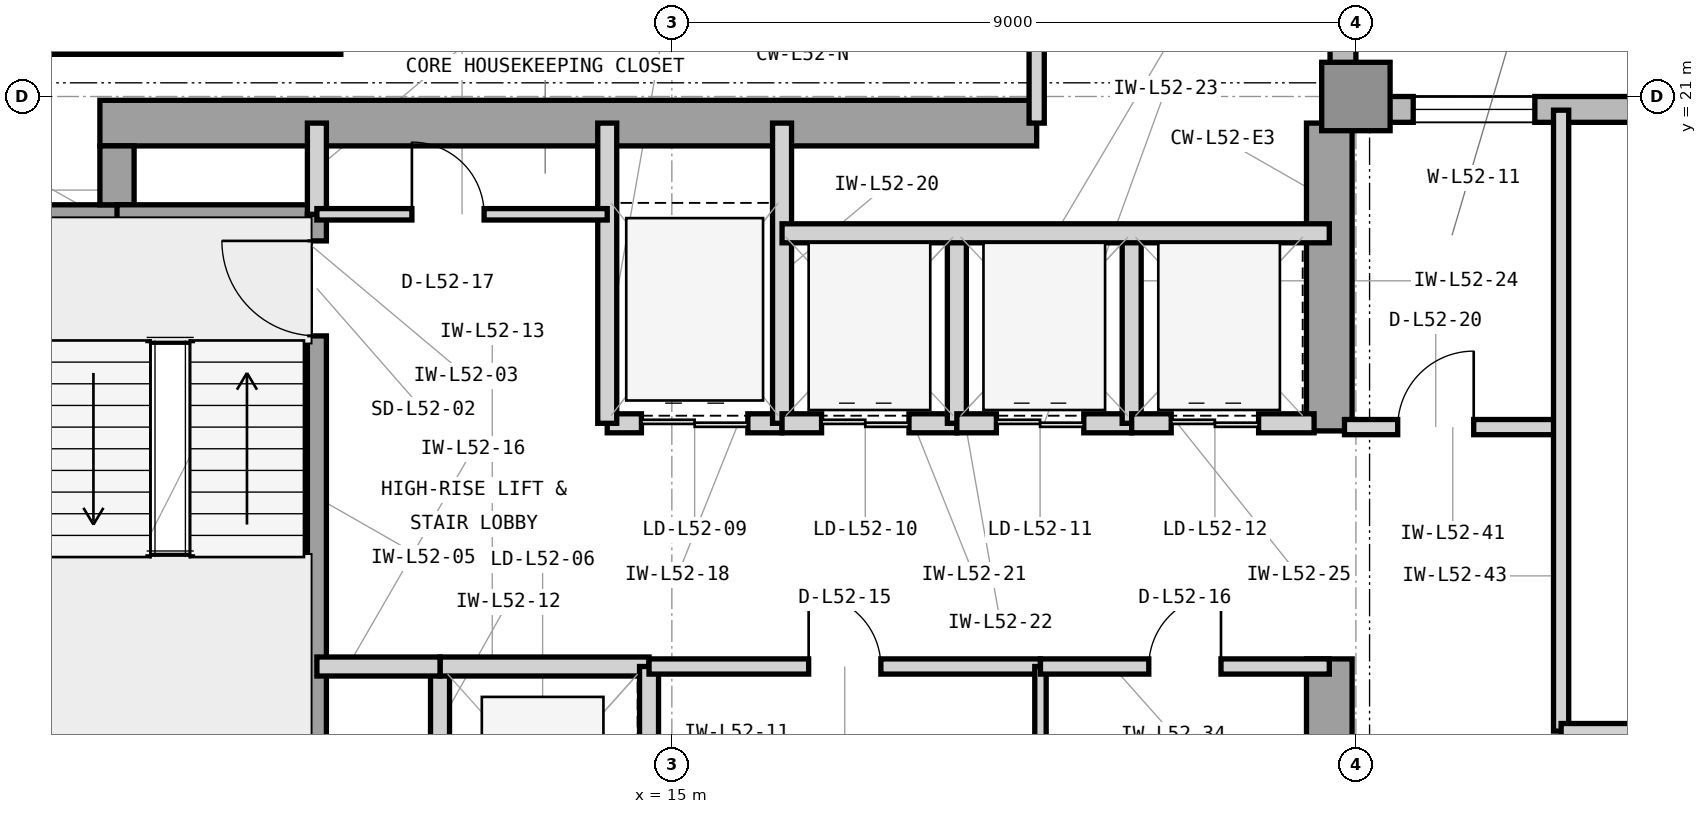
"""IFC4 building model, lengths in metres.
Left out: names, types, materials, properties, quantities, classifications, styles, units other than length and angle.
Written with IfcOpenShell. Run it as: python <this file> out.ifc"""

import sys

from ifc_helpers import new_model, si_unit, direction, frame, frame_2d, origin, origin_2d, place, context, subcontext, project, spatial, rectangle, extrude, element, fill, save


model = new_model("IFC4")
c1 = context("Model", 3, precision=1e-05, world=origin(), true_north=direction((0.0, 1.0)))
c2 = subcontext(c1, "Body", "Model", "MODEL_VIEW")
j1 = project(units=[si_unit("LENGTHUNIT", "METRE"), si_unit("PLANEANGLEUNIT", "RADIAN")], contexts=[c1])
p1 = place(None, origin())
s1 = spatial("IfcSite", under=j1, at=p1, CompositionType="ELEMENT")
p2 = place(p1, origin())
s2 = spatial("IfcBuilding", under=s1, at=p2, CompositionType="ELEMENT")
p3 = place(p2, frame((0.0, 0.0, 215.1)))
s3 = spatial("IfcBuildingStorey", under=s2, at=p3, CompositionType="ELEMENT", Elevation=215.1)
p4 = place(p3, frame((7.475, 20.65, 0.0), z_axis=(0.0, 0.0, 1.0), x_axis=(1.0, 0.0, 0.0)))
e1 = element("IfcWall", 1, at=p4, inside=s3, PredefinedType="SHEAR", context=c2, shape_type="SweptSolid", body=[
    extrude(rectangle(XDim=12.325, YDim=0.6, at=frame_2d((6.163, 0.0))), origin(), (0.0, 0.0, 1.0), 3.9),
])
p5 = place(p3, frame((23.65, 10.4, 0.0), z_axis=(0.0, 0.0, 1.0), x_axis=(0.0, 1.0, 0.0)))
e2 = element("IfcWall", 2, at=p5, inside=s3, PredefinedType="SHEAR", context=c2, shape_type="SweptSolid", body=[
    extrude(rectangle(XDim=3.2, YDim=0.6, at=frame_2d((1.6, 0.0))), origin(), (0.0, 0.0, 1.0), 3.9),
])
p6 = place(p3, frame((23.65, 16.6, 0.0), z_axis=(0.0, 0.0, 1.0), x_axis=(0.0, 1.0, 0.0)))
e3 = element("IfcWall", 3, at=p6, inside=s3, PredefinedType="SHEAR", context=c2, shape_type="SweptSolid", body=[
    extrude(rectangle(XDim=4.05, YDim=0.6, at=frame_2d((2.025, 0.0))), origin(), (0.0, 0.0, 1.0), 3.9),
])
p7 = place(p3, frame((6.65, 19.35, 0.0), z_axis=(0.0, 0.0, 1.0), x_axis=(1.0, 0.0, 0.0)))
e4 = element("IfcWall", 4, at=p7, inside=s3, PredefinedType="SHEAR", context=c2, shape_type="SweptSolid", body=[
    extrude(rectangle(XDim=1.275, YDim=0.45, at=frame_2d((0.638, 0.0))), origin(), (0.0, 0.0, 1.0), 3.9),
])
p8 = place(p3, frame((7.7, 19.575, 0.0), z_axis=(0.0, 0.0, 1.0), x_axis=(0.0, 1.0, 0.0)))
e5 = element("IfcWall", 5, at=p8, inside=s3, PredefinedType="SHEAR", context=c2, shape_type="SweptSolid", body=[
    extrude(rectangle(XDim=0.775, YDim=0.45, at=frame_2d((0.388, 0.0))), origin(), (0.0, 0.0, 1.0), 3.9),
])
p9 = place(p3, frame((24.0, 21.0, 0.0), z_axis=(0.0, 0.0, 1.0), x_axis=(1.0, 0.0, 0.0)))
e6 = element("IfcColumn", 6, at=p9, inside=s3, PredefinedType="COLUMN", context=c2, shape_type="SweptSolid", body=[
    extrude(rectangle(XDim=0.9, YDim=0.9, at=origin_2d()), origin(), (0.0, 0.0, 1.0), 3.9),
])
p10 = place(p3, frame((55.4, 20.83, 0.0), z_axis=(0.0, 0.0, 1.0), x_axis=(-1.0, 0.0, 0.0)))
e7 = element("IfcWall", 7, at=p10, inside=s3, PredefinedType="STANDARD", context=c2, shape_type="SweptSolid", body=[
    extrude(rectangle(XDim=31.4, YDim=0.34, at=frame_2d((15.7, 0.0))), origin(), (0.0, 0.0, 1.0), 3.7),
])
p11 = place(p10, frame((17.167, 0.0, 0.9)))
e8 = element("IfcOpeningElement", 8, at=p11, cuts=e7, PredefinedType="OPENING", context=c2, shape_type="SweptSolid", body=[
    extrude(rectangle(XDim=2.3, YDim=2.2, at=frame_2d((1.15, 1.1))), frame((0.0, 0.18, 0.0), z_axis=(0.0, -1.0, 0.0), x_axis=(1.0, 0.0, 0.0)), (0.0, 0.0, 1.0), 0.36),
])
p12 = place(p10, frame((29.046, 0.0, 0.9)))
e9 = element("IfcOpeningElement", 9, at=p12, cuts=e7, PredefinedType="OPENING", context=c2, shape_type="SweptSolid", body=[
    extrude(rectangle(XDim=1.6, YDim=2.2, at=frame_2d((0.8, 1.1))), frame((0.0, 0.18, 0.0), z_axis=(0.0, -1.0, 0.0), x_axis=(1.0, 0.0, 0.0)), (0.0, 0.0, 1.0), 0.36),
])
p13 = place(p10, frame((8.925, 0.0, 0.9)))
e10 = element("IfcOpeningElement", 10, at=p13, cuts=e7, PredefinedType="OPENING", context=c2, shape_type="SweptSolid", body=[
    extrude(rectangle(XDim=2.3, YDim=2.2, at=frame_2d((1.15, 1.1))), frame((0.0, 0.18, 0.0), z_axis=(0.0, -1.0, 0.0), x_axis=(1.0, 0.0, 0.0)), (0.0, 0.0, 1.0), 0.36),
])
p14 = place(p3, frame((23.83, 21.0, 0.0), z_axis=(0.0, 0.0, 1.0), x_axis=(0.0, 1.0, 0.0)))
e11 = element("IfcWall", 11, at=p14, inside=s3, PredefinedType="STANDARD", context=c2, shape_type="SweptSolid", body=[
    extrude(rectangle(XDim=19.4, YDim=0.34, at=frame_2d((9.7, 0.0))), origin(), (0.0, 0.0, 1.0), 3.7),
])
p15 = place(p14, frame((10.975, 0.0, 0.9)))
e12 = element("IfcOpeningElement", 12, at=p15, cuts=e11, PredefinedType="OPENING", context=c2, shape_type="SweptSolid", body=[
    extrude(rectangle(XDim=2.3, YDim=2.2, at=frame_2d((1.15, 1.1))), frame((0.0, 0.18, 0.0), z_axis=(0.0, -1.0, 0.0), x_axis=(1.0, 0.0, 0.0)), (0.0, 0.0, 1.0), 0.36),
])
p16 = place(p3, frame((7.7, 19.45, 0.0), z_axis=(0.0, 0.0, 1.0), x_axis=(1.0, 0.0, 0.0)))
e13 = element("IfcWall", 13, at=p16, inside=s3, PredefinedType="SHEAR", context=c2, shape_type="SweptSolid", body=[
    extrude(rectangle(XDim=2.755, YDim=0.25, at=frame_2d((1.377, 0.0))), origin(), (0.0, 0.0, 1.0), 3.9),
])
p17 = place(p3, frame((10.33, 12.0, 0.0), z_axis=(0.0, 0.0, 1.0), x_axis=(0.0, 1.0, 0.0)))
e14 = element("IfcWall", 14, at=p17, inside=s3, PredefinedType="SHEAR", context=c2, shape_type="SweptSolid", body=[
    extrude(rectangle(XDim=7.45, YDim=0.25, at=frame_2d((3.725, 0.0))), origin(), (0.0, 0.0, 1.0), 3.9),
])
p18 = place(p17, frame((5.85, 0.0, 0.0)))
e15 = element("IfcOpeningElement", 15, at=p18, cuts=e14, PredefinedType="OPENING", context=c2, shape_type="SweptSolid", body=[
    extrude(rectangle(XDim=1.25, YDim=2.2, at=frame_2d((0.625, 1.1))), frame((0.0, 0.135, 0.0), z_axis=(0.0, -1.0, 0.0), x_axis=(1.0, 0.0, 0.0)), (0.0, 0.0, 1.0), 0.27),
])
p19 = place(p3, frame((10.33, 19.45, 0.0), z_axis=(0.0, 0.0, 1.0), x_axis=(0.0, 1.0, 0.0)))
e16 = element("IfcWall", 16, at=p19, inside=s3, PredefinedType="PARTITIONING", context=c2, shape_type="SweptSolid", body=[
    extrude(rectangle(XDim=1.2, YDim=0.25, at=frame_2d((0.6, 0.0))), origin(), (0.0, 0.0, 1.0), 3.69),
])
p20 = place(p3, frame((11.95, 10.5, 0.0), z_axis=(0.0, 0.0, 1.0), x_axis=(0.0, 1.0, 0.0)))
e17 = element("IfcWall", 17, at=p20, inside=s3, PredefinedType="PARTITIONING", context=c2, shape_type="SweptSolid", body=[
    extrude(rectangle(XDim=3.0, YDim=0.25, at=frame_2d((1.5, 0.0))), origin(), (0.0, 0.0, 1.0), 3.69),
])
p21 = place(p3, frame((11.95, 13.5, 0.0), z_axis=(0.0, 0.0, 1.0), x_axis=(1.0, 0.0, 0.0)))
e18 = element("IfcWall", 18, at=p21, inside=s3, PredefinedType="PARTITIONING", context=c2, shape_type="SweptSolid", body=[
    extrude(rectangle(XDim=2.75, YDim=0.25, at=frame_2d((1.375, 0.0))), origin(), (0.0, 0.0, 1.0), 3.283),
])
p22 = place(p3, frame((14.7, 10.5, 0.0), z_axis=(0.0, 0.0, 1.0), x_axis=(0.0, 1.0, 0.0)))
e19 = element("IfcWall", 19, at=p22, inside=s3, PredefinedType="PARTITIONING", context=c2, shape_type="SweptSolid", body=[
    extrude(rectangle(XDim=3.0, YDim=0.25, at=frame_2d((1.5, 0.0))), origin(), (0.0, 0.0, 1.0), 3.69),
])
p23 = place(p3, frame((10.33, 13.5, 0.0), z_axis=(0.0, 0.0, 1.0), x_axis=(1.0, 0.0, 0.0)))
e20 = element("IfcWall", 20, at=p23, inside=s3, PredefinedType="PARTITIONING", context=c2, shape_type="SweptSolid", body=[
    extrude(rectangle(XDim=1.62, YDim=0.25, at=frame_2d((0.81, 0.0))), origin(), (0.0, 0.0, 1.0), 3.283),
])
p24 = place(p3, frame((14.15, 16.7, 0.0), z_axis=(0.0, 0.0, 1.0), x_axis=(1.0, 0.0, 0.0)))
e21 = element("IfcWall", 21, at=p24, inside=s3, PredefinedType="PARTITIONING", context=c2, shape_type="SweptSolid", body=[
    extrude(rectangle(XDim=2.3, YDim=0.25, at=frame_2d((1.15, 0.0))), origin(), (0.0, 0.0, 1.0), 3.283),
])
p25 = place(p24, frame((0.45, 0.0, 0.0)))
e22 = element("IfcOpeningElement", 22, at=p25, cuts=e21, PredefinedType="OPENING", context=c2, shape_type="SweptSolid", body=[
    extrude(rectangle(XDim=1.4, YDim=2.35, at=frame_2d((0.7, 1.175))), frame((0.0, 0.135, 0.0), z_axis=(0.0, -1.0, 0.0), x_axis=(1.0, 0.0, 0.0)), (0.0, 0.0, 1.0), 0.27),
])
for number, where, z_axis, x_axis in (
    (23, (14.15, 16.7, 0.0), (0.0, 0.0, 1.0), (0.0, 1.0, 0.0)),
    (24, (16.45, 16.7, 0.0), (0.0, 0.0, 1.0), (0.0, 1.0, 0.0)),
):
    element("IfcWall", number, at=place(p3, frame(where, z_axis=z_axis, x_axis=x_axis)), inside=s3, PredefinedType="PARTITIONING", context=c2, shape_type="SweptSolid", body=[
        extrude(rectangle(XDim=3.95, YDim=0.25, at=frame_2d((1.975, 0.0))), origin(), (0.0, 0.0, 1.0), 3.69),
    ])
p26 = place(p3, frame((16.45, 16.7, 0.0), z_axis=(0.0, 0.0, 1.0), x_axis=(1.0, 0.0, 0.0)))
e25 = element("IfcWall", 25, at=p26, inside=s3, PredefinedType="PARTITIONING", context=c2, shape_type="SweptSolid", body=[
    extrude(rectangle(XDim=2.3, YDim=0.25, at=frame_2d((1.15, 0.0))), origin(), (0.0, 0.0, 1.0), 3.283),
])
p27 = place(p26, frame((0.52, 0.0, 0.0)))
e26 = element("IfcOpeningElement", 26, at=p27, cuts=e25, PredefinedType="OPENING", context=c2, shape_type="SweptSolid", body=[
    extrude(rectangle(XDim=1.15, YDim=2.25, at=frame_2d((0.575, 1.125))), frame((0.0, 0.135, 0.0), z_axis=(0.0, -1.0, 0.0), x_axis=(1.0, 0.0, 0.0)), (0.0, 0.0, 1.0), 0.27),
])
p28 = place(p3, frame((18.75, 16.7, 0.0), z_axis=(0.0, 0.0, 1.0), x_axis=(0.0, 1.0, 0.0)))
e27 = element("IfcWall", 27, at=p28, inside=s3, PredefinedType="PARTITIONING", context=c2, shape_type="SweptSolid", body=[
    extrude(rectangle(XDim=2.5, YDim=0.25, at=frame_2d((1.25, 0.0))), origin(), (0.0, 0.0, 1.0), 3.69),
])
p29 = place(p3, frame((18.75, 16.7, 0.0), z_axis=(0.0, 0.0, 1.0), x_axis=(1.0, 0.0, 0.0)))
e28 = element("IfcWall", 28, at=p29, inside=s3, PredefinedType="PARTITIONING", context=c2, shape_type="SweptSolid", body=[
    extrude(rectangle(XDim=2.3, YDim=0.25, at=frame_2d((1.15, 0.0))), origin(), (0.0, 0.0, 1.0), 3.283),
])
p30 = place(p29, frame((0.52, 0.0, 0.0)))
e29 = element("IfcOpeningElement", 29, at=p30, cuts=e28, PredefinedType="OPENING", context=c2, shape_type="SweptSolid", body=[
    extrude(rectangle(XDim=1.15, YDim=2.25, at=frame_2d((0.575, 1.125))), frame((0.0, 0.135, 0.0), z_axis=(0.0, -1.0, 0.0), x_axis=(1.0, 0.0, 0.0)), (0.0, 0.0, 1.0), 0.27),
])
p31 = place(p3, frame((21.05, 16.7, 0.0), z_axis=(0.0, 0.0, 1.0), x_axis=(0.0, 1.0, 0.0)))
e30 = element("IfcWall", 30, at=p31, inside=s3, PredefinedType="PARTITIONING", context=c2, shape_type="SweptSolid", body=[
    extrude(rectangle(XDim=2.5, YDim=0.25, at=frame_2d((1.25, 0.0))), origin(), (0.0, 0.0, 1.0), 3.69),
])
p32 = place(p3, frame((21.05, 16.7, 0.0), z_axis=(0.0, 0.0, 1.0), x_axis=(1.0, 0.0, 0.0)))
e31 = element("IfcWall", 31, at=p32, inside=s3, PredefinedType="PARTITIONING", context=c2, shape_type="SweptSolid", body=[
    extrude(rectangle(XDim=2.4, YDim=0.25, at=frame_2d((1.2, 0.0))), origin(), (0.0, 0.0, 1.0), 3.283),
])
p33 = place(p32, frame((0.52, 0.0, 0.0)))
e32 = element("IfcOpeningElement", 32, at=p33, cuts=e31, PredefinedType="OPENING", context=c2, shape_type="SweptSolid", body=[
    extrude(rectangle(XDim=1.15, YDim=2.25, at=frame_2d((0.575, 1.125))), frame((0.0, 0.135, 0.0), z_axis=(0.0, -1.0, 0.0), x_axis=(1.0, 0.0, 0.0)), (0.0, 0.0, 1.0), 0.27),
])
p34 = place(p3, frame((16.45, 19.2, 0.0), z_axis=(0.0, 0.0, 1.0), x_axis=(1.0, 0.0, 0.0)))
e33 = element("IfcWall", 33, at=p34, inside=s3, PredefinedType="PARTITIONING", context=c2, shape_type="SweptSolid", body=[
    extrude(rectangle(XDim=7.2, YDim=0.25, at=frame_2d((3.6, 0.0))), origin(), (0.0, 0.0, 1.0), 3.69),
])
p35 = place(p3, frame((14.7, 13.5, 0.0), z_axis=(0.0, 0.0, 1.0), x_axis=(1.0, 0.0, 0.0)))
e34 = element("IfcWall", 34, at=p35, inside=s3, PredefinedType="PARTITIONING", context=c2, shape_type="SweptSolid", body=[
    extrude(rectangle(XDim=5.15, YDim=0.2, at=frame_2d((2.575, 0.0))), origin(), (0.0, 0.0, 1.0), 3.283),
])
p36 = place(p35, frame((2.1, 0.0, 0.0)))
e35 = element("IfcOpeningElement", 35, at=p36, cuts=e34, PredefinedType="OPENING", context=c2, shape_type="SweptSolid", body=[
    extrude(rectangle(XDim=0.95, YDim=2.1, at=frame_2d((0.475, 1.05))), frame((0.0, 0.11, 0.0), z_axis=(0.0, -1.0, 0.0), x_axis=(1.0, 0.0, 0.0)), (0.0, 0.0, 1.0), 0.22),
])
p37 = place(p3, frame((19.85, 9.85, 0.0), z_axis=(0.0, 0.0, 1.0), x_axis=(0.0, 1.0, 0.0)))
e36 = element("IfcWall", 36, at=p37, inside=s3, PredefinedType="PARTITIONING", context=c2, shape_type="SweptSolid", body=[
    extrude(rectangle(XDim=3.65, YDim=0.15, at=frame_2d((1.825, 0.0))), origin(), (0.0, 0.0, 1.0), 3.69),
])
p38 = place(p3, frame((19.85, 13.5, 0.0), z_axis=(0.0, 0.0, 1.0), x_axis=(1.0, 0.0, 0.0)))
e37 = element("IfcWall", 37, at=p38, inside=s3, PredefinedType="PARTITIONING", context=c2, shape_type="SweptSolid", body=[
    extrude(rectangle(XDim=3.8, YDim=0.2, at=frame_2d((1.9, 0.0))), origin(), (0.0, 0.0, 1.0), 3.283),
])
p39 = place(p38, frame((1.425, 0.0, 0.0)))
e38 = element("IfcOpeningElement", 38, at=p39, cuts=e37, PredefinedType="OPENING", context=c2, shape_type="SweptSolid", body=[
    extrude(rectangle(XDim=0.95, YDim=2.1, at=frame_2d((0.475, 1.05))), frame((0.0, 0.11, 0.0), z_axis=(0.0, -1.0, 0.0), x_axis=(1.0, 0.0, 0.0)), (0.0, 0.0, 1.0), 0.22),
])
p40 = place(p3, frame((10.33, 19.45, 0.0), z_axis=(0.0, 0.0, 1.0), x_axis=(1.0, 0.0, 0.0)))
e39 = element("IfcWall", 39, at=p40, inside=s3, PredefinedType="PARTITIONING", context=c2, shape_type="SweptSolid", body=[
    extrude(rectangle(XDim=3.82, YDim=0.15, at=frame_2d((1.91, 0.0))), origin(), (0.0, 0.0, 1.0), 3.69),
])
p41 = place(p40, frame((1.25, 0.0, 0.0)))
e40 = element("IfcOpeningElement", 40, at=p41, cuts=e39, PredefinedType="OPENING", context=c2, shape_type="SweptSolid", body=[
    extrude(rectangle(XDim=0.95, YDim=2.1, at=frame_2d((0.475, 1.05))), frame((0.0, 0.085, 0.0), z_axis=(0.0, -1.0, 0.0), x_axis=(1.0, 0.0, 0.0)), (0.0, 0.0, 1.0), 0.17),
])
p42 = place(p3, frame((6.555, 21.68, 0.0), z_axis=(0.0, 0.0, 1.0), x_axis=(1.0, 0.0, 0.0)))
e41 = element("IfcWall", 41, at=p42, inside=s3, PredefinedType="SHEAR", context=c2, shape_type="SweptSolid", body=[
    extrude(rectangle(XDim=4.09, YDim=0.25, at=frame_2d((2.045, 0.0))), origin(), (0.0, 0.0, 1.0), 3.9),
])
p43 = place(p3, frame((23.85, 16.65, 0.0), z_axis=(0.0, 0.0, 1.0), x_axis=(1.0, 0.0, 0.0)))
e42 = element("IfcWall", 42, at=p43, inside=s3, PredefinedType="PARTITIONING", context=c2, shape_type="SweptSolid", body=[
    extrude(rectangle(XDim=2.85, YDim=0.2, at=frame_2d((1.425, 0.0))), origin(), (0.0, 0.0, 1.0), 3.69),
])
p44 = place(p43, frame((0.7, 0.0, 0.0)))
e43 = element("IfcOpeningElement", 43, at=p44, cuts=e42, PredefinedType="OPENING", context=c2, shape_type="SweptSolid", body=[
    extrude(rectangle(XDim=1.0, YDim=2.15, at=frame_2d((0.5, 1.075))), frame((0.0, 0.11, 0.0), z_axis=(0.0, -1.0, 0.0), x_axis=(1.0, 0.0, 0.0)), (0.0, 0.0, 1.0), 0.22),
])
p45 = place(p3, frame((26.7, 12.65, 0.0), z_axis=(0.0, 0.0, 1.0), x_axis=(0.0, 1.0, 0.0)))
e44 = element("IfcWall", 44, at=p45, inside=s3, PredefinedType="PARTITIONING", context=c2, shape_type="SweptSolid", body=[
    extrude(rectangle(XDim=8.17, YDim=0.2, at=frame_2d((4.085, 0.0))), origin(), (0.0, 0.0, 1.0), 3.69),
])
p46 = place(p3, frame((26.7, 12.65, 0.0), z_axis=(0.0, 0.0, 1.0), x_axis=(1.0, 0.0, 0.0)))
e45 = element("IfcWall", 45, at=p46, inside=s3, PredefinedType="PARTITIONING", context=c2, shape_type="SweptSolid", body=[
    extrude(rectangle(XDim=8.0, YDim=0.2, at=frame_2d((4.0, 0.0))), origin(), (0.0, 0.0, 1.0), 3.69),
])
p47 = place(p46, frame((3.5, 0.0, 0.0)))
e46 = element("IfcOpeningElement", 46, at=p47, cuts=e45, PredefinedType="OPENING", context=c2, shape_type="SweptSolid", body=[
    extrude(rectangle(XDim=1.0, YDim=2.15, at=frame_2d((0.5, 1.075))), frame((0.0, 0.11, 0.0), z_axis=(0.0, -1.0, 0.0), x_axis=(1.0, 0.0, 0.0)), (0.0, 0.0, 1.0), 0.22),
])
p48 = place(p3, frame((19.8, 20.65, 0.0), z_axis=(0.0, 0.0, 1.0), x_axis=(0.0, 1.0, 0.0)))
e47 = element("IfcWall", 47, at=p48, inside=s3, PredefinedType="PARTITIONING", context=c2, shape_type="SweptSolid", body=[
    extrude(rectangle(XDim=6.15, YDim=0.2, at=frame_2d((3.075, 0.0))), origin(), (0.0, 0.0, 1.0), 3.69),
])
p49 = place(p18, origin())
e48 = element("IfcDoor", 48, at=p49, inside=s3, OperationType="SINGLE_SWING_RIGHT", PredefinedType="DOOR", context=c2, shape_type="SweptSolid", body=[
    extrude(rectangle(XDim=1.25, YDim=2.2, at=frame_2d((0.625, 1.1))), frame((0.0, 0.025, 0.0), z_axis=(0.0, -1.0, 0.0), x_axis=(1.0, 0.0, 0.0)), (0.0, 0.0, 1.0), 0.05),
])
fill(e15, e48)
p50 = place(p25, origin())
e49 = element("IfcDoor", 49, at=p50, inside=s3, OperationType="DOUBLE_DOOR_SLIDING", PredefinedType="DOOR", context=c2, shape_type="SweptSolid", body=[
    extrude(rectangle(XDim=1.4, YDim=2.35, at=frame_2d((0.7, 1.175))), frame((0.0, 0.025, 0.0), z_axis=(0.0, -1.0, 0.0), x_axis=(1.0, 0.0, 0.0)), (0.0, 0.0, 1.0), 0.05),
])
fill(e22, e49)
p51 = place(p27, origin())
e50 = element("IfcDoor", 50, at=p51, inside=s3, OperationType="DOUBLE_DOOR_SLIDING", PredefinedType="DOOR", context=c2, shape_type="SweptSolid", body=[
    extrude(rectangle(XDim=1.15, YDim=2.25, at=frame_2d((0.575, 1.125))), frame((0.0, 0.025, 0.0), z_axis=(0.0, -1.0, 0.0), x_axis=(1.0, 0.0, 0.0)), (0.0, 0.0, 1.0), 0.05),
])
fill(e26, e50)
p52 = place(p30, origin())
e51 = element("IfcDoor", 51, at=p52, inside=s3, OperationType="DOUBLE_DOOR_SLIDING", PredefinedType="DOOR", context=c2, shape_type="SweptSolid", body=[
    extrude(rectangle(XDim=1.15, YDim=2.25, at=frame_2d((0.575, 1.125))), frame((0.0, 0.025, 0.0), z_axis=(0.0, -1.0, 0.0), x_axis=(1.0, 0.0, 0.0)), (0.0, 0.0, 1.0), 0.05),
])
fill(e29, e51)
p53 = place(p33, origin())
e52 = element("IfcDoor", 52, at=p53, inside=s3, OperationType="DOUBLE_DOOR_SLIDING", PredefinedType="DOOR", context=c2, shape_type="SweptSolid", body=[
    extrude(rectangle(XDim=1.15, YDim=2.25, at=frame_2d((0.575, 1.125))), frame((0.0, 0.025, 0.0), z_axis=(0.0, -1.0, 0.0), x_axis=(1.0, 0.0, 0.0)), (0.0, 0.0, 1.0), 0.05),
])
fill(e32, e52)
p54 = place(p36, origin())
e53 = element("IfcDoor", 53, at=p54, inside=s3, OperationType="SINGLE_SWING_LEFT", PredefinedType="DOOR", context=c2, shape_type="SweptSolid", body=[
    extrude(rectangle(XDim=0.95, YDim=2.1, at=frame_2d((0.475, 1.05))), frame((0.0, 0.025, 0.0), z_axis=(0.0, -1.0, 0.0), x_axis=(1.0, 0.0, 0.0)), (0.0, 0.0, 1.0), 0.05),
])
fill(e35, e53)
p55 = place(p39, origin())
e54 = element("IfcDoor", 54, at=p55, inside=s3, OperationType="SINGLE_SWING_RIGHT", PredefinedType="DOOR", context=c2, shape_type="SweptSolid", body=[
    extrude(rectangle(XDim=0.95, YDim=2.1, at=frame_2d((0.475, 1.05))), frame((0.0, 0.025, 0.0), z_axis=(0.0, -1.0, 0.0), x_axis=(1.0, 0.0, 0.0)), (0.0, 0.0, 1.0), 0.05),
])
fill(e38, e54)
p56 = place(p41, origin())
e55 = element("IfcDoor", 55, at=p56, inside=s3, OperationType="SINGLE_SWING_LEFT", PredefinedType="DOOR", context=c2, shape_type="SweptSolid", body=[
    extrude(rectangle(XDim=0.95, YDim=2.1, at=frame_2d((0.475, 1.05))), frame((0.0, 0.025, 0.0), z_axis=(0.0, -1.0, 0.0), x_axis=(1.0, 0.0, 0.0)), (0.0, 0.0, 1.0), 0.05),
])
fill(e40, e55)
p57 = place(p44, origin())
e56 = element("IfcDoor", 56, at=p57, inside=s3, OperationType="SINGLE_SWING_RIGHT", PredefinedType="DOOR", context=c2, shape_type="SweptSolid", body=[
    extrude(rectangle(XDim=1.0, YDim=2.15, at=frame_2d((0.5, 1.075))), frame((0.0, 0.025, 0.0), z_axis=(0.0, -1.0, 0.0), x_axis=(1.0, 0.0, 0.0)), (0.0, 0.0, 1.0), 0.05),
])
fill(e43, e56)
p58 = place(p12, origin())
e57 = element("IfcWindow", 57, at=p58, inside=s3, PartitioningType="SINGLE_PANEL", PredefinedType="WINDOW", context=c2, shape_type="SweptSolid", body=[
    extrude(rectangle(XDim=1.6, YDim=2.2, at=frame_2d((0.8, 1.1))), frame((0.0, 0.11, 0.0), z_axis=(0.0, -1.0, 0.0), x_axis=(1.0, 0.0, 0.0)), (0.0, 0.0, 1.0), 0.06),
])
fill(e9, e57)
save(model, sys.argv[1])
